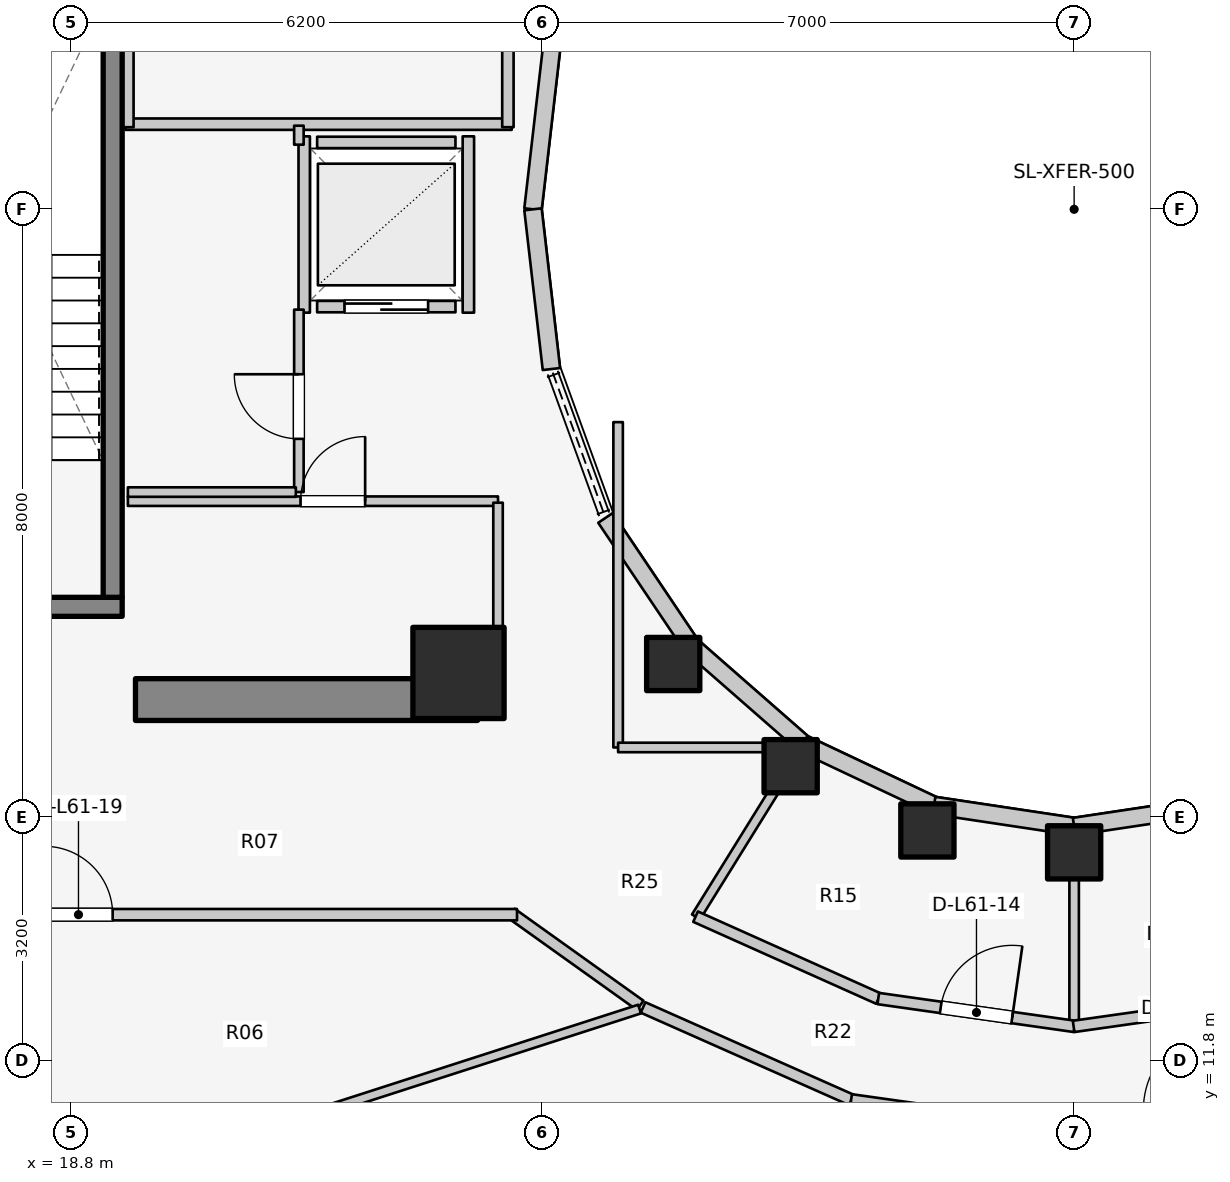
"""IFC4 building model, lengths in metres.
Left out: names, types, materials, properties, quantities, classifications, styles, units other than length and angle.
Written with IfcOpenShell. Run it as: python <this file> out.ifc"""

import sys

from ifc_helpers import new_model, si_unit, direction, frame, frame_2d, origin, origin_2d, place, context, subcontext, project, spatial, rectangle, extrude, element, fill, save


model = new_model("IFC4")
c1 = context("Model", 3, precision=1e-05, world=origin(), true_north=direction((0.0, 1.0)))
c2 = subcontext(c1, "Body", "Model", "MODEL_VIEW")
j1 = project(units=[si_unit("LENGTHUNIT", "METRE"), si_unit("PLANEANGLEUNIT", "RADIAN")], contexts=[c1])
p1 = place(None, origin())
s1 = spatial("IfcSite", under=j1, at=p1, CompositionType="ELEMENT")
p2 = place(p1, origin())
s2 = spatial("IfcBuilding", under=s1, at=p2, CompositionType="ELEMENT")
p3 = place(p2, frame((0.0, 0.0, 201.6)))
s3 = spatial("IfcBuildingStorey", under=s2, at=p3, CompositionType="ELEMENT", Elevation=201.6)
p4 = place(p3, frame((19.65, 16.55, 0.0), z_axis=(0.0, 0.0, 1.0), x_axis=(1.0, 0.0, 0.0)))
e1 = element("IfcWall", 1, at=p4, inside=s3, PredefinedType="SHEAR", context=c2, shape_type="SweptSolid", body=[
    extrude(rectangle(XDim=4.5, YDim=0.55, at=frame_2d((2.25, 0.0))), origin(), (0.0, 0.0, 1.0), 3.1),
])
p5 = place(p3, frame((16.105, 17.77, 0.0), z_axis=(0.0, 0.0, 1.0), x_axis=(1.0, 0.0, 0.0)))
e2 = element("IfcWall", 2, at=p5, inside=s3, PredefinedType="SOLIDWALL", context=c2, shape_type="SweptSolid", body=[
    extrude(rectangle(XDim=3.37, YDim=0.25, at=frame_2d((1.685, 0.0))), origin(), (0.0, 0.0, 1.0), 3.1),
])
p6 = place(p5, frame((1.135, 0.0, 0.0)))
e3 = element("IfcOpeningElement", 3, at=p6, cuts=e2, PredefinedType="OPENING", context=c2, shape_type="SweptSolid", body=[
    extrude(rectangle(XDim=1.1, YDim=2.1, at=frame_2d((0.55, 1.05))), frame((0.0, 0.135, 0.0), z_axis=(0.0, -1.0, 0.0), x_axis=(1.0, 0.0, 0.0)), (0.0, 0.0, 1.0), 0.27),
])
p7 = place(p3, frame((19.35, 17.895, 0.0), z_axis=(0.0, 0.0, 1.0), x_axis=(0.0, 1.0, 0.0)))
e4 = element("IfcWall", 4, at=p7, inside=s3, PredefinedType="SOLIDWALL", context=c2, shape_type="SweptSolid", body=[
    extrude(rectangle(XDim=7.81, YDim=0.25, at=frame_2d((3.905, 0.0))), origin(), (0.0, 0.0, 1.0), 3.1),
])
p8 = place(p3, frame((23.9, 16.9, 0.0), z_axis=(0.0, 0.0, 1.0), x_axis=(1.0, 0.0, 0.0)))
e5 = element("IfcColumn", 5, at=p8, inside=s3, PredefinedType="COLUMN", context=c2, shape_type="SweptSolid", body=[
    extrude(rectangle(XDim=1.2, YDim=1.2, at=origin_2d()), origin(), (0.0, 0.0, 1.0), 3.1),
])
for number, where, z_axis, x_axis in (
    (6, (26.725, 17.018, 0.0), (0.0, 0.0, 1.0), (1.0, 0.0, 0.0)),
    (7, (28.27, 15.673, 0.0), (0.0, 0.0, 1.0), (1.0, 0.0, 0.0)),
    (8, (30.069, 14.828, 0.0), (0.0, 0.0, 1.0), (1.0, 0.0, 0.0)),
    (9, (32.0, 14.54, 0.0), (0.0, 0.0, 1.0), (1.0, 0.0, 0.0)),
):
    element("IfcColumn", number, at=place(p3, frame(where, z_axis=z_axis, x_axis=x_axis)), inside=s3, PredefinedType="COLUMN", context=c2, shape_type="SweptSolid", body=[
        extrude(rectangle(XDim=0.7, YDim=0.7, at=origin_2d()), origin(), (0.0, 0.0, 1.0), 3.1),
    ])
for number, where, z_axis, x_axis in (
    (10, (25.123, 25.102, 0.0), (0.0, 0.0, 1.0), (-0.115, -0.993, 0.0)),
    (11, (24.88, 23.0, 0.0), (0.0, 0.0, 1.0), (0.115, -0.993, 0.0)),
):
    element("IfcWall", number, at=place(p3, frame(where, z_axis=z_axis, x_axis=x_axis)), inside=s3, PredefinedType="STANDARD", context=c2, shape_type="SweptSolid", body=[
        extrude(rectangle(XDim=2.115, YDim=0.23, at=frame_2d((1.058, 0.0))), origin(), (0.0, 0.0, 1.0), 2.84),
    ])
p9 = place(p3, frame((25.834, 18.94, 0.0), z_axis=(0.0, 0.0, 1.0), x_axis=(0.558197800898, -0.829707909492, 0.0)))
e12 = element("IfcWall", 12, at=p9, inside=s3, PredefinedType="STANDARD", context=c2, shape_type="SweptSolid", body=[
    extrude(rectangle(XDim=2.027, YDim=0.23, at=frame_2d((1.013, 0.0))), origin(), (0.0, 0.0, 1.0), 2.16),
])
p10 = place(p3, frame((26.965, 17.258, 0.0), z_axis=(0.0, 0.0, 1.0), x_axis=(0.752576694707, -0.658504607869, 0.0)))
e13 = element("IfcWall", 13, at=p10, inside=s3, PredefinedType="STANDARD", context=c2, shape_type="SweptSolid", body=[
    extrude(rectangle(XDim=1.959, YDim=0.23, at=frame_2d((0.98, 0.0))), origin(), (0.0, 0.0, 1.0), 2.16),
])
p11 = place(p3, frame((28.44, 15.968, 0.0), z_axis=(0.0, 0.0, 1.0), x_axis=(0.904179699603, -0.427152280606, 0.0)))
e14 = element("IfcWall", 14, at=p11, inside=s3, PredefinedType="STANDARD", context=c2, shape_type="SweptSolid", body=[
    extrude(rectangle(XDim=1.899, YDim=0.23, at=frame_2d((0.95, 0.0))), origin(), (0.0, 0.0, 1.0), 2.16),
])
for number, where, z_axis, x_axis in (
    (15, (30.157, 15.157, 0.0), (0.0, 0.0, 1.0), (0.989, -0.149, 0.0)),
    (16, (32.0, 14.88, 0.0), (0.0, 0.0, 1.0), (0.989, 0.149, 0.0)),
):
    element("IfcWall", number, at=place(p3, frame(where, z_axis=z_axis, x_axis=x_axis)), inside=s3, PredefinedType="STANDARD", context=c2, shape_type="SweptSolid", body=[
        extrude(rectangle(XDim=1.864, YDim=0.23, at=frame_2d((0.932, 0.0))), origin(), (0.0, 0.0, 1.0), 2.16),
    ])
p12 = place(p3, frame((16.442, 11.728, 0.0), z_axis=(0.0, 0.0, 1.0), x_axis=(0.88849146803, -0.458893137057, 0.0)))
e17 = element("IfcWall", 17, at=p12, inside=s3, PredefinedType="STANDARD", context=c2, shape_type="SweptSolid", body=[
    extrude(rectangle(XDim=4.15, YDim=0.26, at=frame_2d((2.075, 0.0))), origin(), (0.0, 0.0, 1.0), 2.85),
])
p13 = place(p3, frame((22.04, 21.72, 0.0), z_axis=(0.0, 0.0, 1.0), x_axis=(1.0, 0.0, 0.0)))
e18 = element("IfcWall", 18, at=p13, inside=s3, PredefinedType="SOLIDWALL", context=c2, shape_type="SweptSolid", body=[
    extrude(rectangle(XDim=1.82, YDim=0.15, at=frame_2d((0.91, 0.0))), origin(), (0.0, 0.0, 1.0), 2.12),
])
p14 = place(p13, frame((0.36, 0.0, 0.0)))
e19 = element("IfcOpeningElement", 19, at=p14, cuts=e18, PredefinedType="OPENING", context=c2, shape_type="SweptSolid", body=[
    extrude(rectangle(XDim=1.1, YDim=2.1, at=frame_2d((0.55, 1.05))), frame((0.0, 0.085, 0.0), z_axis=(0.0, -1.0, 0.0), x_axis=(1.0, 0.0, 0.0)), (0.0, 0.0, 1.0), 0.17),
])
p15 = place(p3, frame((22.04, 23.88, 0.0), z_axis=(0.0, 0.0, 1.0), x_axis=(1.0, 0.0, 0.0)))
e20 = element("IfcWall", 20, at=p15, inside=s3, PredefinedType="SOLIDWALL", context=c2, shape_type="SweptSolid", body=[
    extrude(rectangle(XDim=1.82, YDim=0.15, at=frame_2d((0.91, 0.0))), origin(), (0.0, 0.0, 1.0), 2.12),
])
p16 = place(p3, frame((21.87, 21.64, 0.0), z_axis=(0.0, 0.0, 1.0), x_axis=(0.0, 1.0, 0.0)))
e21 = element("IfcWall", 21, at=p16, inside=s3, PredefinedType="SOLIDWALL", context=c2, shape_type="SweptSolid", body=[
    extrude(rectangle(XDim=2.32, YDim=0.15, at=frame_2d((1.16, 0.0))), origin(), (0.0, 0.0, 1.0), 2.855),
])
p17 = place(p3, frame((24.03, 21.64, 0.0), z_axis=(0.0, 0.0, 1.0), x_axis=(0.0, 1.0, 0.0)))
e22 = element("IfcWall", 22, at=p17, inside=s3, PredefinedType="SOLIDWALL", context=c2, shape_type="SweptSolid", body=[
    extrude(rectangle(XDim=2.32, YDim=0.15, at=frame_2d((1.16, 0.0))), origin(), (0.0, 0.0, 1.0), 2.12),
])
p18 = place(p3, frame((19.52, 24.12, 0.0), z_axis=(0.0, 0.0, 1.0), x_axis=(1.0, 0.0, 0.0)))
e23 = element("IfcWall", 23, at=p18, inside=s3, PredefinedType="PARTITIONING", context=c2, shape_type="SweptSolid", body=[
    extrude(rectangle(XDim=5.08, YDim=0.15, at=frame_2d((2.54, 0.0))), origin(), (0.0, 0.0, 1.0), 2.12),
])
p19 = place(p3, frame((19.55, 24.08, 0.0), z_axis=(0.0, 0.0, 1.0), x_axis=(0.0, 1.0, 0.0)))
e24 = element("IfcWall", 24, at=p19, inside=s3, PredefinedType="PARTITIONING", context=c2, shape_type="SweptSolid", body=[
    extrude(rectangle(XDim=3.2, YDim=0.15, at=frame_2d((1.6, 0.0))), origin(), (0.0, 0.0, 1.0), 2.855),
])
p20 = place(p3, frame((24.55, 24.08, 0.0), z_axis=(0.0, 0.0, 1.0), x_axis=(0.0, 1.0, 0.0)))
e25 = element("IfcWall", 25, at=p20, inside=s3, PredefinedType="PARTITIONING", context=c2, shape_type="SweptSolid", body=[
    extrude(rectangle(XDim=3.4, YDim=0.15, at=frame_2d((1.7, 0.0))), origin(), (0.0, 0.0, 1.0), 2.855),
])
p21 = place(p20, frame((2.02, 0.0, 0.0)))
e26 = element("IfcOpeningElement", 26, at=p21, cuts=e25, PredefinedType="OPENING", context=c2, shape_type="SweptSolid", body=[
    extrude(rectangle(XDim=1.1, YDim=2.1, at=frame_2d((0.55, 1.05))), frame((0.0, 0.085, 0.0), z_axis=(0.0, -1.0, 0.0), x_axis=(1.0, 0.0, 0.0)), (0.0, 0.0, 1.0), 0.17),
])
p22 = place(p3, frame((19.55, 19.16, 0.0), z_axis=(0.0, 0.0, 1.0), x_axis=(1.0, 0.0, 0.0)))
e27 = element("IfcWall", 27, at=p22, inside=s3, PredefinedType="PARTITIONING", context=c2, shape_type="SweptSolid", body=[
    extrude(rectangle(XDim=4.87, YDim=0.125, at=frame_2d((2.435, 0.0))), origin(), (0.0, 0.0, 1.0), 2.12),
])
p23 = place(p22, frame((2.272, 0.0, 0.0)))
e28 = element("IfcOpeningElement", 28, at=p23, cuts=e27, PredefinedType="OPENING", context=c2, shape_type="SweptSolid", body=[
    extrude(rectangle(XDim=0.85, YDim=2.05, at=frame_2d((0.425, 1.025))), frame((0.0, 0.073, 0.0), z_axis=(0.0, -1.0, 0.0), x_axis=(1.0, 0.0, 0.0)), (0.0, 0.0, 1.0), 0.145),
])
p24 = place(p3, frame((24.42, 17.1, 0.0), z_axis=(0.0, 0.0, 1.0), x_axis=(0.0, 1.0, 0.0)))
e29 = element("IfcWall", 29, at=p24, inside=s3, PredefinedType="PARTITIONING", context=c2, shape_type="SweptSolid", body=[
    extrude(rectangle(XDim=2.04, YDim=0.125, at=frame_2d((1.02, 0.0))), origin(), (0.0, 0.0, 1.0), 2.232),
])
p25 = place(p3, frame((21.8, 19.28, 0.0), z_axis=(0.0, 0.0, 1.0), x_axis=(0.0, 1.0, 0.0)))
e30 = element("IfcWall", 30, at=p25, inside=s3, PredefinedType="PARTITIONING", context=c2, shape_type="SweptSolid", body=[
    extrude(rectangle(XDim=2.4, YDim=0.125, at=frame_2d((1.2, 0.0))), origin(), (0.0, 0.0, 1.0), 2.855),
])
p26 = place(p25, frame((0.7, 0.0, 0.0)))
e31 = element("IfcOpeningElement", 31, at=p26, cuts=e30, PredefinedType="OPENING", context=c2, shape_type="SweptSolid", body=[
    extrude(rectangle(XDim=0.85, YDim=2.05, at=frame_2d((0.425, 1.025))), frame((0.0, 0.073, 0.0), z_axis=(0.0, -1.0, 0.0), x_axis=(1.0, 0.0, 0.0)), (0.0, 0.0, 1.0), 0.145),
])
p27 = place(p3, frame((21.8, 23.85, 0.0), z_axis=(0.0, 0.0, 1.0), x_axis=(0.0, 1.0, 0.0)))
e32 = element("IfcWall", 32, at=p27, inside=s3, PredefinedType="PARTITIONING", context=c2, shape_type="SweptSolid", body=[
    extrude(rectangle(XDim=0.25, YDim=0.125, at=frame_2d((0.125, 0.0))), origin(), (0.0, 0.0, 1.0), 2.855),
])
p28 = place(p3, frame((19.55, 19.28, 0.0), z_axis=(0.0, 0.0, 1.0), x_axis=(1.0, 0.0, 0.0)))
e33 = element("IfcWall", 33, at=p28, inside=s3, PredefinedType="PARTITIONING", context=c2, shape_type="SweptSolid", body=[
    extrude(rectangle(XDim=2.21, YDim=0.125, at=frame_2d((1.105, 0.0))), origin(), (0.0, 0.0, 1.0), 2.12),
])
p29 = place(p3, frame((28.45, 15.985, 0.0), z_axis=(0.0, 0.0, 1.0), x_axis=(-0.527527080983, -0.849538215049, 0.0)))
e34 = element("IfcWall", 34, at=p29, inside=s3, PredefinedType="PARTITIONING", context=c2, shape_type="SweptSolid", body=[
    extrude(rectangle(XDim=2.701, YDim=0.125, at=frame_2d((1.351, 0.0))), origin(), (0.0, 0.0, 1.0), 2.376),
])
p30 = place(p3, frame((32.0, 14.9, 0.0), z_axis=(0.0, 0.0, 1.0), x_axis=(0.0, -1.0, 0.0)))
e35 = element("IfcWall", 35, at=p30, inside=s3, PredefinedType="PARTITIONING", context=c2, shape_type="SweptSolid", body=[
    extrude(rectangle(XDim=2.65, YDim=0.125, at=frame_2d((1.325, 0.0))), origin(), (0.0, 0.0, 1.0), 2.376),
])
p31 = place(p3, frame((27.019, 13.694, 0.0), z_axis=(0.0, 0.0, 1.0), x_axis=(0.912628408652, -0.408790151203, 0.0)))
e36 = element("IfcWall", 36, at=p31, inside=s3, PredefinedType="PARTITIONING", context=c2, shape_type="SweptSolid", body=[
    extrude(rectangle(XDim=2.638, YDim=0.15, at=frame_2d((1.319, 0.0))), origin(), (0.0, 0.0, 1.0), 2.376),
])
p32 = place(p3, frame((29.423, 12.617, 0.0), z_axis=(0.0, 0.0, 1.0), x_axis=(0.990078185178, -0.140517569133, 0.0)))
e37 = element("IfcWall", 37, at=p32, inside=s3, PredefinedType="PARTITIONING", context=c2, shape_type="SweptSolid", body=[
    extrude(rectangle(XDim=2.61, YDim=0.15, at=frame_2d((1.305, 0.0))), origin(), (0.0, 0.0, 1.0), 2.376),
])
p33 = place(p32, frame((0.83, 0.0, 0.0)))
e38 = element("IfcOpeningElement", 38, at=p33, cuts=e37, PredefinedType="OPENING", context=c2, shape_type="SweptSolid", body=[
    extrude(rectangle(XDim=0.95, YDim=2.1, at=frame_2d((0.475, 1.05))), frame((0.0, 0.085, 0.0), z_axis=(0.0, -1.0, 0.0), x_axis=(1.0, 0.0, 0.0)), (0.0, 0.0, 1.0), 0.17),
])
p34 = place(p3, frame((31.993, 12.25, 0.0), z_axis=(0.0, 0.0, 1.0), x_axis=(0.990078185178, 0.140517569133, 0.0)))
e39 = element("IfcWall", 39, at=p34, inside=s3, PredefinedType="PARTITIONING", context=c2, shape_type="SweptSolid", body=[
    extrude(rectangle(XDim=2.61, YDim=0.15, at=frame_2d((1.305, 0.0))), origin(), (0.0, 0.0, 1.0), 2.376),
])
p35 = place(p3, frame((26.0, 15.92, 0.0), z_axis=(0.0, 0.0, 1.0), x_axis=(0.0, 1.0, 0.0)))
e40 = element("IfcWall", 40, at=p35, inside=s3, PredefinedType="PARTITIONING", context=c2, shape_type="SweptSolid", body=[
    extrude(rectangle(XDim=4.28, YDim=0.125, at=frame_2d((2.14, 0.0))), origin(), (0.0, 0.0, 1.0), 2.232),
])
p36 = place(p3, frame((26.0, 15.92, 0.0), z_axis=(0.0, 0.0, 1.0), x_axis=(1.0, 0.0, 0.0)))
e41 = element("IfcWall", 41, at=p36, inside=s3, PredefinedType="PARTITIONING", context=c2, shape_type="SweptSolid", body=[
    extrude(rectangle(XDim=2.6, YDim=0.125, at=frame_2d((1.3, 0.0))), origin(), (0.0, 0.0, 1.0), 2.232),
])
p37 = place(p3, frame((26.29, 12.527, 0.0), z_axis=(0.0, 0.0, 1.0), x_axis=(-0.813780999276, 0.581171648669, 0.0)))
e42 = element("IfcWall", 42, at=p37, inside=s3, PredefinedType="PARTITIONING", context=c2, shape_type="SweptSolid", body=[
    extrude(rectangle(XDim=2.082, YDim=0.15, at=frame_2d((1.041, 0.0))), origin(), (0.0, 0.0, 1.0), 2.376),
])
p38 = place(p3, frame((17.15, 13.72, 0.0), z_axis=(0.0, 0.0, 1.0), x_axis=(1.0, 0.0, 0.0)))
e43 = element("IfcWall", 43, at=p38, inside=s3, PredefinedType="PARTITIONING", context=c2, shape_type="SweptSolid", body=[
    extrude(rectangle(XDim=7.52, YDim=0.15, at=frame_2d((3.76, 0.0))), origin(), (0.0, 0.0, 1.0), 2.376),
])
p39 = place(p38, frame((1.3, 0.0, 0.0)))
e44 = element("IfcOpeningElement", 44, at=p39, cuts=e43, PredefinedType="OPENING", context=c2, shape_type="SweptSolid", body=[
    extrude(rectangle(XDim=0.9, YDim=2.1, at=frame_2d((0.45, 1.05))), frame((0.0, 0.085, 0.0), z_axis=(0.0, -1.0, 0.0), x_axis=(1.0, 0.0, 0.0)), (0.0, 0.0, 1.0), 0.17),
])
p40 = place(p3, frame((26.283, 12.478, 0.0), z_axis=(0.0, 0.0, 1.0), x_axis=(-0.951711719757, -0.306993163568, 0.0)))
e45 = element("IfcWall", 45, at=p40, inside=s3, PredefinedType="MOVABLE", context=c2, shape_type="SweptSolid", body=[
    extrude(rectangle(XDim=5.934, YDim=0.12, at=frame_2d((2.967, 0.0))), origin(), (0.0, 0.0, 1.0), 2.376),
])
p41 = place(p3, frame((26.328, 12.499, 0.0), z_axis=(0.0, 0.0, 1.0), x_axis=(0.914043013008, -0.4056172708, 0.0)))
e46 = element("IfcWall", 46, at=p41, inside=s3, PredefinedType="PARTITIONING", context=c2, shape_type="SweptSolid", body=[
    extrude(rectangle(XDim=2.999, YDim=0.15, at=frame_2d((1.5, 0.0))), origin(), (0.0, 0.0, 1.0), 2.376),
])
p42 = place(p3, frame((29.066, 11.284, 0.0), z_axis=(0.0, 0.0, 1.0), x_axis=(0.990214490255, -0.139553800697, 0.0)))
e47 = element("IfcWall", 47, at=p42, inside=s3, PredefinedType="PARTITIONING", context=c2, shape_type="SweptSolid", body=[
    extrude(rectangle(XDim=2.965, YDim=0.15, at=frame_2d((1.483, 0.0))), origin(), (0.0, 0.0, 1.0), 2.376),
])
p43 = place(p3, frame((31.998, 10.87, 0.0), z_axis=(0.0, 0.0, 1.0), x_axis=(0.990214490255, 0.139553800697, 0.0)))
e48 = element("IfcWall", 48, at=p43, inside=s3, PredefinedType="PARTITIONING", context=c2, shape_type="SweptSolid", body=[
    extrude(rectangle(XDim=2.965, YDim=0.15, at=frame_2d((1.483, 0.0))), origin(), (0.0, 0.0, 1.0), 2.376),
])
p44 = place(p43, frame((0.933, 0.0, 0.0)))
e49 = element("IfcOpeningElement", 49, at=p44, cuts=e48, PredefinedType="OPENING", context=c2, shape_type="SweptSolid", body=[
    extrude(rectangle(XDim=1.1, YDim=2.1, at=frame_2d((0.55, 1.05))), frame((0.0, 0.085, 0.0), z_axis=(0.0, -1.0, 0.0), x_axis=(1.0, 0.0, 0.0)), (0.0, 0.0, 1.0), 0.17),
])
p45 = place(p14, origin())
e50 = element("IfcDoor", 50, at=p45, inside=s3, OperationType="DOUBLE_DOOR_SLIDING", PredefinedType="DOOR", context=c2, shape_type="SweptSolid", body=[
    extrude(rectangle(XDim=1.1, YDim=2.1, at=frame_2d((0.55, 1.05))), frame((0.0, 0.025, 0.0), z_axis=(0.0, -1.0, 0.0), x_axis=(1.0, 0.0, 0.0)), (0.0, 0.0, 1.0), 0.05),
])
fill(e19, e50)
p46 = place(p23, origin())
e51 = element("IfcDoor", 51, at=p46, inside=s3, OperationType="SINGLE_SWING_RIGHT", PredefinedType="DOOR", context=c2, shape_type="SweptSolid", body=[
    extrude(rectangle(XDim=0.85, YDim=2.05, at=frame_2d((0.425, 1.025))), frame((0.0, 0.025, 0.0), z_axis=(0.0, -1.0, 0.0), x_axis=(1.0, 0.0, 0.0)), (0.0, 0.0, 1.0), 0.05),
])
fill(e28, e51)
p47 = place(p26, origin())
e52 = element("IfcDoor", 52, at=p47, inside=s3, OperationType="SINGLE_SWING_RIGHT", PredefinedType="DOOR", context=c2, shape_type="SweptSolid", body=[
    extrude(rectangle(XDim=0.85, YDim=2.05, at=frame_2d((0.425, 1.025))), frame((0.0, 0.025, 0.0), z_axis=(0.0, -1.0, 0.0), x_axis=(1.0, 0.0, 0.0)), (0.0, 0.0, 1.0), 0.05),
])
fill(e31, e52)
p48 = place(p33, origin())
e53 = element("IfcDoor", 53, at=p48, inside=s3, OperationType="SINGLE_SWING_RIGHT", PredefinedType="DOOR", context=c2, shape_type="SweptSolid", body=[
    extrude(rectangle(XDim=0.95, YDim=2.1, at=frame_2d((0.475, 1.05))), frame((0.0, 0.025, 0.0), z_axis=(0.0, -1.0, 0.0), x_axis=(1.0, 0.0, 0.0)), (0.0, 0.0, 1.0), 0.05),
])
fill(e38, e53)
p49 = place(p39, origin())
e54 = element("IfcDoor", 54, at=p49, inside=s3, OperationType="SINGLE_SWING_LEFT", PredefinedType="DOOR", context=c2, shape_type="SweptSolid", body=[
    extrude(rectangle(XDim=0.9, YDim=2.1, at=frame_2d((0.45, 1.05))), frame((0.0, 0.025, 0.0), z_axis=(0.0, -1.0, 0.0), x_axis=(1.0, 0.0, 0.0)), (0.0, 0.0, 1.0), 0.05),
])
fill(e44, e54)
save(model, sys.argv[1])
